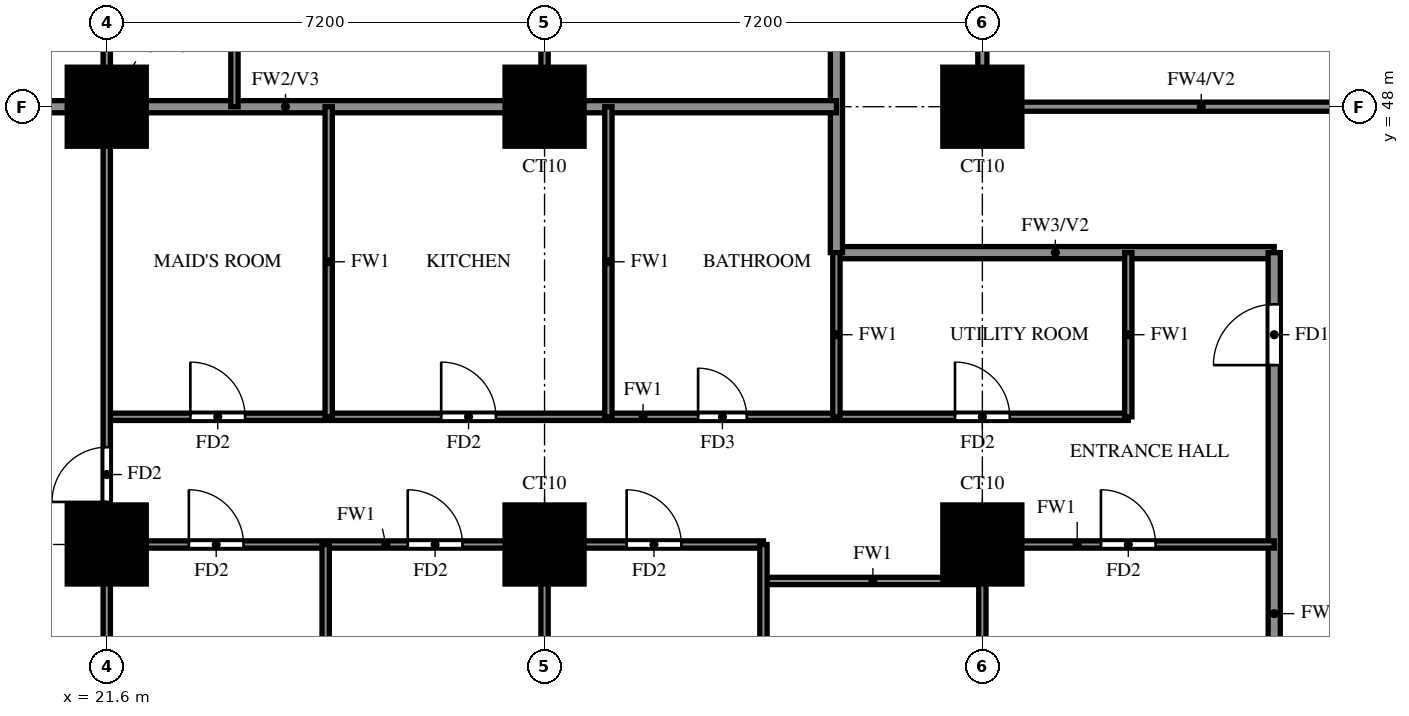
"""IFC4 building model, lengths in metres.
Left out: names, types, materials, properties, quantities, classifications, styles, units other than length and angle.
Written with IfcOpenShell. Run it as: python <this file> out.ifc"""

import sys

from ifc_helpers import new_model, si_unit, direction, frame, frame_2d, origin, origin_2d, place, context, subcontext, project, spatial, rectangle, extrude, source, transform, mapped, element, fill, save


model = new_model("IFC4")
c1 = context("Model", 3, precision=1e-05, world=origin(), true_north=direction((0.0, 1.0)))
c2 = subcontext(c1, "Body", "Model", "MODEL_VIEW")
j1 = project(units=[si_unit("LENGTHUNIT", "METRE"), si_unit("PLANEANGLEUNIT", "RADIAN")], contexts=[c1])
p1 = place(None, origin())
s1 = spatial("IfcSite", under=j1, at=p1, CompositionType="ELEMENT")
p2 = place(p1, origin())
s2 = spatial("IfcBuilding", under=s1, at=p2, CompositionType="ELEMENT")
p3 = place(p2, frame((0.0, 0.0, 65.5)))
s3 = spatial("IfcBuildingStorey", under=s2, at=p3, CompositionType="ELEMENT", Elevation=65.5)
m1 = source(origin(), c2, "Body", "SweptSolid", [
    extrude(rectangle(XDim=1.3, YDim=1.3, at=origin_2d()), origin(), (0.0, 0.0, 1.0), 3.18),
])
for number, where, z_axis, x_axis in (
    (1, (21.6, 40.8, 0.0), (0.0, 0.0, 1.0), (1.0, 0.0, 0.0)),
    (2, (28.8, 40.8, 0.0), (0.0, 0.0, 1.0), (1.0, 0.0, 0.0)),
    (3, (36.0, 40.8, 0.0), (0.0, 0.0, 1.0), (1.0, 0.0, 0.0)),
    (4, (21.6, 48.0, 0.0), (0.0, 0.0, 1.0), (1.0, 0.0, 0.0)),
    (5, (28.8, 48.0, 0.0), (0.0, 0.0, 1.0), (1.0, 0.0, 0.0)),
    (6, (36.0, 48.0, 0.0), (0.0, 0.0, 1.0), (1.0, 0.0, 0.0)),
):
    element("IfcColumn", number, at=place(p3, frame(where, z_axis=z_axis, x_axis=x_axis)), inside=s3, PredefinedType="COLUMN", context=c2, shape_type="MappedRepresentation", body=[
        mapped(m1, transform((0.0, 0.0, 0.0))),
    ])
p4 = place(p3, frame((33.6, 45.6, 0.0), z_axis=(0.0, 0.0, 1.0), x_axis=(1.0, 0.0, 0.0)))
e7 = element("IfcWall", 7, at=p4, inside=s3, PredefinedType="SOLIDWALL", context=c2, shape_type="SweptSolid", body=[
    extrude(rectangle(XDim=7.2, YDim=0.2, at=frame_2d((3.6, 0.0))), origin(), (0.0, 0.0, 1.0), 3.18),
])
p5 = place(p3, frame((33.6, 45.6, 0.0), z_axis=(0.0, 0.0, 1.0), x_axis=(0.0, 1.0, 0.0)))
e8 = element("IfcWall", 8, at=p5, inside=s3, PredefinedType="SOLIDWALL", context=c2, shape_type="SweptSolid", body=[
    extrude(rectangle(XDim=12.0, YDim=0.2, at=frame_2d((6.0, 0.0))), origin(), (0.0, 0.0, 1.0), 3.18),
])
p6 = place(p3, frame((40.8, 33.725, 0.0), z_axis=(0.0, 0.0, 1.0), x_axis=(0.0, 1.0, 0.0)))
e9 = element("IfcWall", 9, at=p6, inside=s3, PredefinedType="SOLIDWALL", context=c2, shape_type="SweptSolid", body=[
    extrude(rectangle(XDim=11.875, YDim=0.2, at=frame_2d((5.938, 0.0))), origin(), (0.0, 0.0, 1.0), 2.28),
])
p7 = place(p6, frame((10.025, 0.0, 0.0)))
e10 = element("IfcOpeningElement", 10, at=p7, cuts=e9, PredefinedType="OPENING", context=c2, shape_type="SweptSolid", body=[
    extrude(rectangle(XDim=1.0, YDim=2.1, at=frame_2d((0.5, 1.05))), frame((0.0, 0.11, 0.0), z_axis=(0.0, -1.0, 0.0), x_axis=(1.0, 0.0, 0.0)), (0.0, 0.0, 1.0), 0.22),
])
p8 = place(p3, frame((14.525, 48.0, 0.0), z_axis=(0.0, 0.0, 1.0), x_axis=(1.0, 0.0, 0.0)))
e11 = element("IfcWall", 11, at=p8, inside=s3, PredefinedType="SOLIDWALL", context=c2, shape_type="SweptSolid", body=[
    extrude(rectangle(XDim=19.075, YDim=0.2, at=frame_2d((9.538, 0.0))), origin(), (0.0, 0.0, 1.0), 3.18),
])
p9 = place(p3, frame((32.4, 40.2, 0.0), z_axis=(0.0, 0.0, 1.0), x_axis=(1.0, 0.0, 0.0)))
e12 = element("IfcWall", 12, at=p9, inside=s3, PredefinedType="PARTITIONING", context=c2, shape_type="SweptSolid", body=[
    extrude(rectangle(XDim=3.6, YDim=0.12, at=frame_2d((1.8, 0.0))), origin(), (0.0, 0.0, 1.0), 3.18),
])
p10 = place(p3, frame((21.6, 40.8, 0.0), z_axis=(0.0, 0.0, 1.0), x_axis=(1.0, 0.0, 0.0)))
e13 = element("IfcWall", 13, at=p10, inside=s3, PredefinedType="PARTITIONING", context=c2, shape_type="SweptSolid", body=[
    extrude(rectangle(XDim=10.8, YDim=0.12, at=frame_2d((5.4, 0.0))), origin(), (0.0, 0.0, 1.0), 3.18),
])
p11 = place(p10, frame((1.35, 0.0, 0.0)))
e14 = element("IfcOpeningElement", 14, at=p11, cuts=e13, PredefinedType="OPENING", context=c2, shape_type="SweptSolid", body=[
    extrude(rectangle(XDim=0.9, YDim=2.1, at=frame_2d((0.45, 1.05))), frame((0.0, 0.07, 0.0), z_axis=(0.0, -1.0, 0.0), x_axis=(1.0, 0.0, 0.0)), (0.0, 0.0, 1.0), 0.14),
])
p12 = place(p10, frame((4.95, 0.0, 0.0)))
e15 = element("IfcOpeningElement", 15, at=p12, cuts=e13, PredefinedType="OPENING", context=c2, shape_type="SweptSolid", body=[
    extrude(rectangle(XDim=0.9, YDim=2.1, at=frame_2d((0.45, 1.05))), frame((0.0, 0.07, 0.0), z_axis=(0.0, -1.0, 0.0), x_axis=(1.0, 0.0, 0.0)), (0.0, 0.0, 1.0), 0.14),
])
p13 = place(p10, frame((8.55, 0.0, 0.0)))
e16 = element("IfcOpeningElement", 16, at=p13, cuts=e13, PredefinedType="OPENING", context=c2, shape_type="SweptSolid", body=[
    extrude(rectangle(XDim=0.9, YDim=2.1, at=frame_2d((0.45, 1.05))), frame((0.0, 0.07, 0.0), z_axis=(0.0, -1.0, 0.0), x_axis=(1.0, 0.0, 0.0)), (0.0, 0.0, 1.0), 0.14),
])
p14 = place(p3, frame((36.0, 40.8, 0.0), z_axis=(0.0, 0.0, 1.0), x_axis=(1.0, 0.0, 0.0)))
e17 = element("IfcWall", 17, at=p14, inside=s3, PredefinedType="PARTITIONING", context=c2, shape_type="SweptSolid", body=[
    extrude(rectangle(XDim=4.8, YDim=0.12, at=frame_2d((2.4, 0.0))), origin(), (0.0, 0.0, 1.0), 3.18),
])
p15 = place(p14, frame((1.95, 0.0, 0.0)))
e18 = element("IfcOpeningElement", 18, at=p15, cuts=e17, PredefinedType="OPENING", context=c2, shape_type="SweptSolid", body=[
    extrude(rectangle(XDim=0.9, YDim=2.1, at=frame_2d((0.45, 1.05))), frame((0.0, 0.07, 0.0), z_axis=(0.0, -1.0, 0.0), x_axis=(1.0, 0.0, 0.0)), (0.0, 0.0, 1.0), 0.14),
])
p16 = place(p3, frame((21.6, 42.9, 0.0), z_axis=(0.0, 0.0, 1.0), x_axis=(1.0, 0.0, 0.0)))
e19 = element("IfcWall", 19, at=p16, inside=s3, PredefinedType="PARTITIONING", context=c2, shape_type="SweptSolid", body=[
    extrude(rectangle(XDim=16.8, YDim=0.12, at=frame_2d((8.4, 0.0))), origin(), (0.0, 0.0, 1.0), 3.18),
])
p17 = place(p16, frame((1.375, 0.0, 0.0)))
e20 = element("IfcOpeningElement", 20, at=p17, cuts=e19, PredefinedType="OPENING", context=c2, shape_type="SweptSolid", body=[
    extrude(rectangle(XDim=0.9, YDim=2.1, at=frame_2d((0.45, 1.05))), frame((0.0, 0.07, 0.0), z_axis=(0.0, -1.0, 0.0), x_axis=(1.0, 0.0, 0.0)), (0.0, 0.0, 1.0), 0.14),
])
p18 = place(p16, frame((5.5, 0.0, 0.0)))
e21 = element("IfcOpeningElement", 21, at=p18, cuts=e19, PredefinedType="OPENING", context=c2, shape_type="SweptSolid", body=[
    extrude(rectangle(XDim=0.9, YDim=2.1, at=frame_2d((0.45, 1.05))), frame((0.0, 0.07, 0.0), z_axis=(0.0, -1.0, 0.0), x_axis=(1.0, 0.0, 0.0)), (0.0, 0.0, 1.0), 0.14),
])
p19 = place(p16, frame((9.725, 0.0, 0.0)))
e22 = element("IfcOpeningElement", 22, at=p19, cuts=e19, PredefinedType="OPENING", context=c2, shape_type="SweptSolid", body=[
    extrude(rectangle(XDim=0.8, YDim=2.1, at=frame_2d((0.4, 1.05))), frame((0.0, 0.07, 0.0), z_axis=(0.0, -1.0, 0.0), x_axis=(1.0, 0.0, 0.0)), (0.0, 0.0, 1.0), 0.14),
])
p20 = place(p16, frame((13.95, 0.0, 0.0)))
e23 = element("IfcOpeningElement", 23, at=p20, cuts=e19, PredefinedType="OPENING", context=c2, shape_type="SweptSolid", body=[
    extrude(rectangle(XDim=0.9, YDim=2.1, at=frame_2d((0.45, 1.05))), frame((0.0, 0.07, 0.0), z_axis=(0.0, -1.0, 0.0), x_axis=(1.0, 0.0, 0.0)), (0.0, 0.0, 1.0), 0.14),
])
p21 = place(p3, frame((21.6, 33.725, 0.0), z_axis=(0.0, 0.0, 1.0), x_axis=(0.0, 1.0, 0.0)))
e24 = element("IfcWall", 24, at=p21, inside=s3, PredefinedType="PARTITIONING", context=c2, shape_type="SweptSolid", body=[
    extrude(rectangle(XDim=39.475, YDim=0.12, at=frame_2d((19.737, 0.0))), origin(), (0.0, 0.0, 1.0), 3.18),
])
p22 = place(p21, frame((7.775, 0.0, 0.0)))
e25 = element("IfcOpeningElement", 25, at=p22, cuts=e24, PredefinedType="OPENING", context=c2, shape_type="SweptSolid", body=[
    extrude(rectangle(XDim=0.9, YDim=2.1, at=frame_2d((0.45, 1.05))), frame((0.0, 0.07, 0.0), z_axis=(0.0, -1.0, 0.0), x_axis=(1.0, 0.0, 0.0)), (0.0, 0.0, 1.0), 0.14),
])
p23 = place(p21, frame((15.625, 0.0, 0.0)))
e26 = element("IfcOpeningElement", 26, at=p23, cuts=e24, PredefinedType="OPENING", context=c2, shape_type="SweptSolid", body=[
    extrude(rectangle(XDim=0.9, YDim=2.1, at=frame_2d((0.45, 1.05))), frame((0.0, 0.07, 0.0), z_axis=(0.0, -1.0, 0.0), x_axis=(1.0, 0.0, 0.0)), (0.0, 0.0, 1.0), 0.14),
])
p24 = place(p21, frame((19.225, 0.0, 0.0)))
e27 = element("IfcOpeningElement", 27, at=p24, cuts=e24, PredefinedType="OPENING", context=c2, shape_type="SweptSolid", body=[
    extrude(rectangle(XDim=0.9, YDim=2.1, at=frame_2d((0.45, 1.05))), frame((0.0, 0.07, 0.0), z_axis=(0.0, -1.0, 0.0), x_axis=(1.0, 0.0, 0.0)), (0.0, 0.0, 1.0), 0.14),
])
p25 = place(p21, frame((24.325, 0.0, 0.0)))
e28 = element("IfcOpeningElement", 28, at=p25, cuts=e24, PredefinedType="OPENING", context=c2, shape_type="SweptSolid", body=[
    extrude(rectangle(XDim=1.5, YDim=2.1, at=frame_2d((0.75, 1.05))), frame((0.0, 0.07, 0.0), z_axis=(0.0, -1.0, 0.0), x_axis=(1.0, 0.0, 0.0)), (0.0, 0.0, 1.0), 0.14),
])
p26 = place(p21, frame((30.025, 0.0, 0.0)))
e29 = element("IfcOpeningElement", 29, at=p26, cuts=e24, PredefinedType="OPENING", context=c2, shape_type="SweptSolid", body=[
    extrude(rectangle(XDim=0.9, YDim=2.1, at=frame_2d((0.45, 1.05))), frame((0.0, 0.07, 0.0), z_axis=(0.0, -1.0, 0.0), x_axis=(1.0, 0.0, 0.0)), (0.0, 0.0, 1.0), 0.14),
])
p27 = place(p21, frame((33.625, 0.0, 0.0)))
e30 = element("IfcOpeningElement", 30, at=p27, cuts=e24, PredefinedType="OPENING", context=c2, shape_type="SweptSolid", body=[
    extrude(rectangle(XDim=0.9, YDim=2.1, at=frame_2d((0.45, 1.05))), frame((0.0, 0.07, 0.0), z_axis=(0.0, -1.0, 0.0), x_axis=(1.0, 0.0, 0.0)), (0.0, 0.0, 1.0), 0.14),
])
p28 = place(p21, frame((37.225, 0.0, 0.0)))
e31 = element("IfcOpeningElement", 31, at=p28, cuts=e24, PredefinedType="OPENING", context=c2, shape_type="SweptSolid", body=[
    extrude(rectangle(XDim=0.9, YDim=2.1, at=frame_2d((0.45, 1.05))), frame((0.0, 0.07, 0.0), z_axis=(0.0, -1.0, 0.0), x_axis=(1.0, 0.0, 0.0)), (0.0, 0.0, 1.0), 0.14),
])
p29 = place(p3, frame((23.7, 48.0, 0.0), z_axis=(0.0, 0.0, 1.0), x_axis=(0.0, 1.0, 0.0)))
e32 = element("IfcWall", 32, at=p29, inside=s3, PredefinedType="PARTITIONING", context=c2, shape_type="SweptSolid", body=[
    extrude(rectangle(XDim=7.2, YDim=0.12, at=frame_2d((3.6, 0.0))), origin(), (0.0, 0.0, 1.0), 3.18),
])
p30 = place(p29, frame((1.925, 0.0, 0.0)))
e33 = element("IfcOpeningElement", 33, at=p30, cuts=e32, PredefinedType="OPENING", context=c2, shape_type="SweptSolid", body=[
    extrude(rectangle(XDim=0.9, YDim=2.1, at=frame_2d((0.45, 1.05))), frame((0.0, 0.07, 0.0), z_axis=(0.0, -1.0, 0.0), x_axis=(1.0, 0.0, 0.0)), (0.0, 0.0, 1.0), 0.14),
])
p31 = place(p3, frame((25.2, 33.725, 0.0), z_axis=(0.0, 0.0, 1.0), x_axis=(0.0, 1.0, 0.0)))
e34 = element("IfcWall", 34, at=p31, inside=s3, PredefinedType="PARTITIONING", context=c2, shape_type="SweptSolid", body=[
    extrude(rectangle(XDim=7.075, YDim=0.12, at=frame_2d((3.538, 0.0))), origin(), (0.0, 0.0, 1.0), 2.28),
])
p32 = place(p3, frame((25.25, 42.9, 0.0), z_axis=(0.0, 0.0, 1.0), x_axis=(0.0, 1.0, 0.0)))
e35 = element("IfcWall", 35, at=p32, inside=s3, PredefinedType="PARTITIONING", context=c2, shape_type="SweptSolid", body=[
    extrude(rectangle(XDim=5.1, YDim=0.12, at=frame_2d((2.55, 0.0))), origin(), (0.0, 0.0, 1.0), 3.18),
])
p33 = place(p3, frame((28.8, 33.725, 0.0), z_axis=(0.0, 0.0, 1.0), x_axis=(0.0, 1.0, 0.0)))
e36 = element("IfcWall", 36, at=p33, inside=s3, PredefinedType="PARTITIONING", context=c2, shape_type="SweptSolid", body=[
    extrude(rectangle(XDim=7.075, YDim=0.12, at=frame_2d((3.538, 0.0))), origin(), (0.0, 0.0, 1.0), 3.18),
])
p34 = place(p3, frame((28.8, 48.0, 0.0), z_axis=(0.0, 0.0, 1.0), x_axis=(0.0, 1.0, 0.0)))
e37 = element("IfcWall", 37, at=p34, inside=s3, PredefinedType="PARTITIONING", context=c2, shape_type="SweptSolid", body=[
    extrude(rectangle(XDim=7.2, YDim=0.12, at=frame_2d((3.6, 0.0))), origin(), (0.0, 0.0, 1.0), 3.18),
])
p35 = place(p3, frame((29.85, 42.9, 0.0), z_axis=(0.0, 0.0, 1.0), x_axis=(0.0, 1.0, 0.0)))
e38 = element("IfcWall", 38, at=p35, inside=s3, PredefinedType="PARTITIONING", context=c2, shape_type="SweptSolid", body=[
    extrude(rectangle(XDim=5.1, YDim=0.12, at=frame_2d((2.55, 0.0))), origin(), (0.0, 0.0, 1.0), 3.18),
])
p36 = place(p3, frame((32.4, 33.725, 0.0), z_axis=(0.0, 0.0, 1.0), x_axis=(0.0, 1.0, 0.0)))
e39 = element("IfcWall", 39, at=p36, inside=s3, PredefinedType="PARTITIONING", context=c2, shape_type="SweptSolid", body=[
    extrude(rectangle(XDim=7.075, YDim=0.12, at=frame_2d((3.538, 0.0))), origin(), (0.0, 0.0, 1.0), 2.28),
])
p37 = place(p36, frame((2.837, 0.0, 0.0)))
e40 = element("IfcOpeningElement", 40, at=p37, cuts=e39, PredefinedType="OPENING", context=c2, shape_type="SweptSolid", body=[
    extrude(rectangle(XDim=0.8, YDim=2.1, at=frame_2d((0.4, 1.05))), frame((0.0, 0.07, 0.0), z_axis=(0.0, -1.0, 0.0), x_axis=(1.0, 0.0, 0.0)), (0.0, 0.0, 1.0), 0.14),
])
p38 = place(p3, frame((33.6, 42.9, 0.0), z_axis=(0.0, 0.0, 1.0), x_axis=(0.0, 1.0, 0.0)))
e41 = element("IfcWall", 41, at=p38, inside=s3, PredefinedType="PARTITIONING", context=c2, shape_type="SweptSolid", body=[
    extrude(rectangle(XDim=2.7, YDim=0.12, at=frame_2d((1.35, 0.0))), origin(), (0.0, 0.0, 1.0), 3.18),
])
p39 = place(p3, frame((36.0, 33.725, 0.0), z_axis=(0.0, 0.0, 1.0), x_axis=(0.0, 1.0, 0.0)))
e42 = element("IfcWall", 42, at=p39, inside=s3, PredefinedType="PARTITIONING", context=c2, shape_type="SweptSolid", body=[
    extrude(rectangle(XDim=7.075, YDim=0.12, at=frame_2d((3.538, 0.0))), origin(), (0.0, 0.0, 1.0), 3.18),
])
p40 = place(p3, frame((38.4, 42.9, 0.0), z_axis=(0.0, 0.0, 1.0), x_axis=(0.0, 1.0, 0.0)))
e43 = element("IfcWall", 43, at=p40, inside=s3, PredefinedType="PARTITIONING", context=c2, shape_type="SweptSolid", body=[
    extrude(rectangle(XDim=2.7, YDim=0.12, at=frame_2d((1.35, 0.0))), origin(), (0.0, 0.0, 1.0), 3.18),
])
p41 = place(p3, frame((36.0, 48.0, 0.0), z_axis=(0.0, 0.0, 1.0), x_axis=(1.0, 0.0, 0.0)))
e44 = element("IfcWall", 44, at=p41, inside=s3, PredefinedType="SOLIDWALL", context=c2, shape_type="SweptSolid", body=[
    extrude(rectangle(XDim=7.2, YDim=0.15, at=frame_2d((3.6, 0.0))), origin(), (0.0, 0.0, 1.0), 2.28),
])
p42 = place(p3, frame((36.0, 48.0, 0.0), z_axis=(0.0, 0.0, 1.0), x_axis=(0.0, 1.0, 0.0)))
e45 = element("IfcWall", 45, at=p42, inside=s3, PredefinedType="SOLIDWALL", context=c2, shape_type="SweptSolid", body=[
    extrude(rectangle(XDim=14.4, YDim=0.15, at=frame_2d((7.2, 0.0))), origin(), (0.0, 0.0, 1.0), 2.28),
])
p43 = place(p7, origin())
e46 = element("IfcDoor", 46, at=p43, inside=s3, OperationType="SINGLE_SWING_LEFT", PredefinedType="DOOR", context=c2, shape_type="SweptSolid", body=[
    extrude(rectangle(XDim=1.0, YDim=2.1, at=frame_2d((0.5, 1.05))), frame((0.0, 0.025, 0.0), z_axis=(0.0, -1.0, 0.0), x_axis=(1.0, 0.0, 0.0)), (0.0, 0.0, 1.0), 0.05),
])
fill(e10, e46)
p44 = place(p22, origin())
e47 = element("IfcDoor", 47, at=p44, inside=s3, OperationType="SINGLE_SWING_RIGHT", PredefinedType="DOOR", context=c2, shape_type="SweptSolid", body=[
    extrude(rectangle(XDim=0.9, YDim=2.1, at=frame_2d((0.45, 1.05))), frame((0.0, 0.025, 0.0), z_axis=(0.0, -1.0, 0.0), x_axis=(1.0, 0.0, 0.0)), (0.0, 0.0, 1.0), 0.05),
])
fill(e25, e47)
p45 = place(p11, origin())
e48 = element("IfcDoor", 48, at=p45, inside=s3, OperationType="SINGLE_SWING_RIGHT", PredefinedType="DOOR", context=c2, shape_type="SweptSolid", body=[
    extrude(rectangle(XDim=0.9, YDim=2.1, at=frame_2d((0.45, 1.05))), frame((0.0, 0.025, 0.0), z_axis=(0.0, -1.0, 0.0), x_axis=(1.0, 0.0, 0.0)), (0.0, 0.0, 1.0), 0.05),
])
fill(e14, e48)
p46 = place(p12, origin())
e49 = element("IfcDoor", 49, at=p46, inside=s3, OperationType="SINGLE_SWING_LEFT", PredefinedType="DOOR", context=c2, shape_type="SweptSolid", body=[
    extrude(rectangle(XDim=0.9, YDim=2.1, at=frame_2d((0.45, 1.05))), frame((0.0, 0.025, 0.0), z_axis=(0.0, -1.0, 0.0), x_axis=(1.0, 0.0, 0.0)), (0.0, 0.0, 1.0), 0.05),
])
fill(e15, e49)
p47 = place(p13, origin())
e50 = element("IfcDoor", 50, at=p47, inside=s3, OperationType="SINGLE_SWING_LEFT", PredefinedType="DOOR", context=c2, shape_type="SweptSolid", body=[
    extrude(rectangle(XDim=0.9, YDim=2.1, at=frame_2d((0.45, 1.05))), frame((0.0, 0.025, 0.0), z_axis=(0.0, -1.0, 0.0), x_axis=(1.0, 0.0, 0.0)), (0.0, 0.0, 1.0), 0.05),
])
fill(e16, e50)
p48 = place(p15, origin())
e51 = element("IfcDoor", 51, at=p48, inside=s3, OperationType="SINGLE_SWING_LEFT", PredefinedType="DOOR", context=c2, shape_type="SweptSolid", body=[
    extrude(rectangle(XDim=0.9, YDim=2.1, at=frame_2d((0.45, 1.05))), frame((0.0, 0.025, 0.0), z_axis=(0.0, -1.0, 0.0), x_axis=(1.0, 0.0, 0.0)), (0.0, 0.0, 1.0), 0.05),
])
fill(e18, e51)
p49 = place(p17, origin())
e52 = element("IfcDoor", 52, at=p49, inside=s3, OperationType="SINGLE_SWING_LEFT", PredefinedType="DOOR", context=c2, shape_type="SweptSolid", body=[
    extrude(rectangle(XDim=0.9, YDim=2.1, at=frame_2d((0.45, 1.05))), frame((0.0, 0.025, 0.0), z_axis=(0.0, -1.0, 0.0), x_axis=(1.0, 0.0, 0.0)), (0.0, 0.0, 1.0), 0.05),
])
fill(e20, e52)
p50 = place(p18, origin())
e53 = element("IfcDoor", 53, at=p50, inside=s3, OperationType="SINGLE_SWING_RIGHT", PredefinedType="DOOR", context=c2, shape_type="SweptSolid", body=[
    extrude(rectangle(XDim=0.9, YDim=2.1, at=frame_2d((0.45, 1.05))), frame((0.0, 0.025, 0.0), z_axis=(0.0, -1.0, 0.0), x_axis=(1.0, 0.0, 0.0)), (0.0, 0.0, 1.0), 0.05),
])
fill(e21, e53)
p51 = place(p19, origin())
e54 = element("IfcDoor", 54, at=p51, inside=s3, OperationType="SINGLE_SWING_LEFT", PredefinedType="DOOR", context=c2, shape_type="SweptSolid", body=[
    extrude(rectangle(XDim=0.8, YDim=2.1, at=frame_2d((0.4, 1.05))), frame((0.0, 0.025, 0.0), z_axis=(0.0, -1.0, 0.0), x_axis=(1.0, 0.0, 0.0)), (0.0, 0.0, 1.0), 0.05),
])
fill(e22, e54)
p52 = place(p20, origin())
e55 = element("IfcDoor", 55, at=p52, inside=s3, OperationType="SINGLE_SWING_LEFT", PredefinedType="DOOR", context=c2, shape_type="SweptSolid", body=[
    extrude(rectangle(XDim=0.9, YDim=2.1, at=frame_2d((0.45, 1.05))), frame((0.0, 0.025, 0.0), z_axis=(0.0, -1.0, 0.0), x_axis=(1.0, 0.0, 0.0)), (0.0, 0.0, 1.0), 0.05),
])
fill(e23, e55)
save(model, sys.argv[1])
